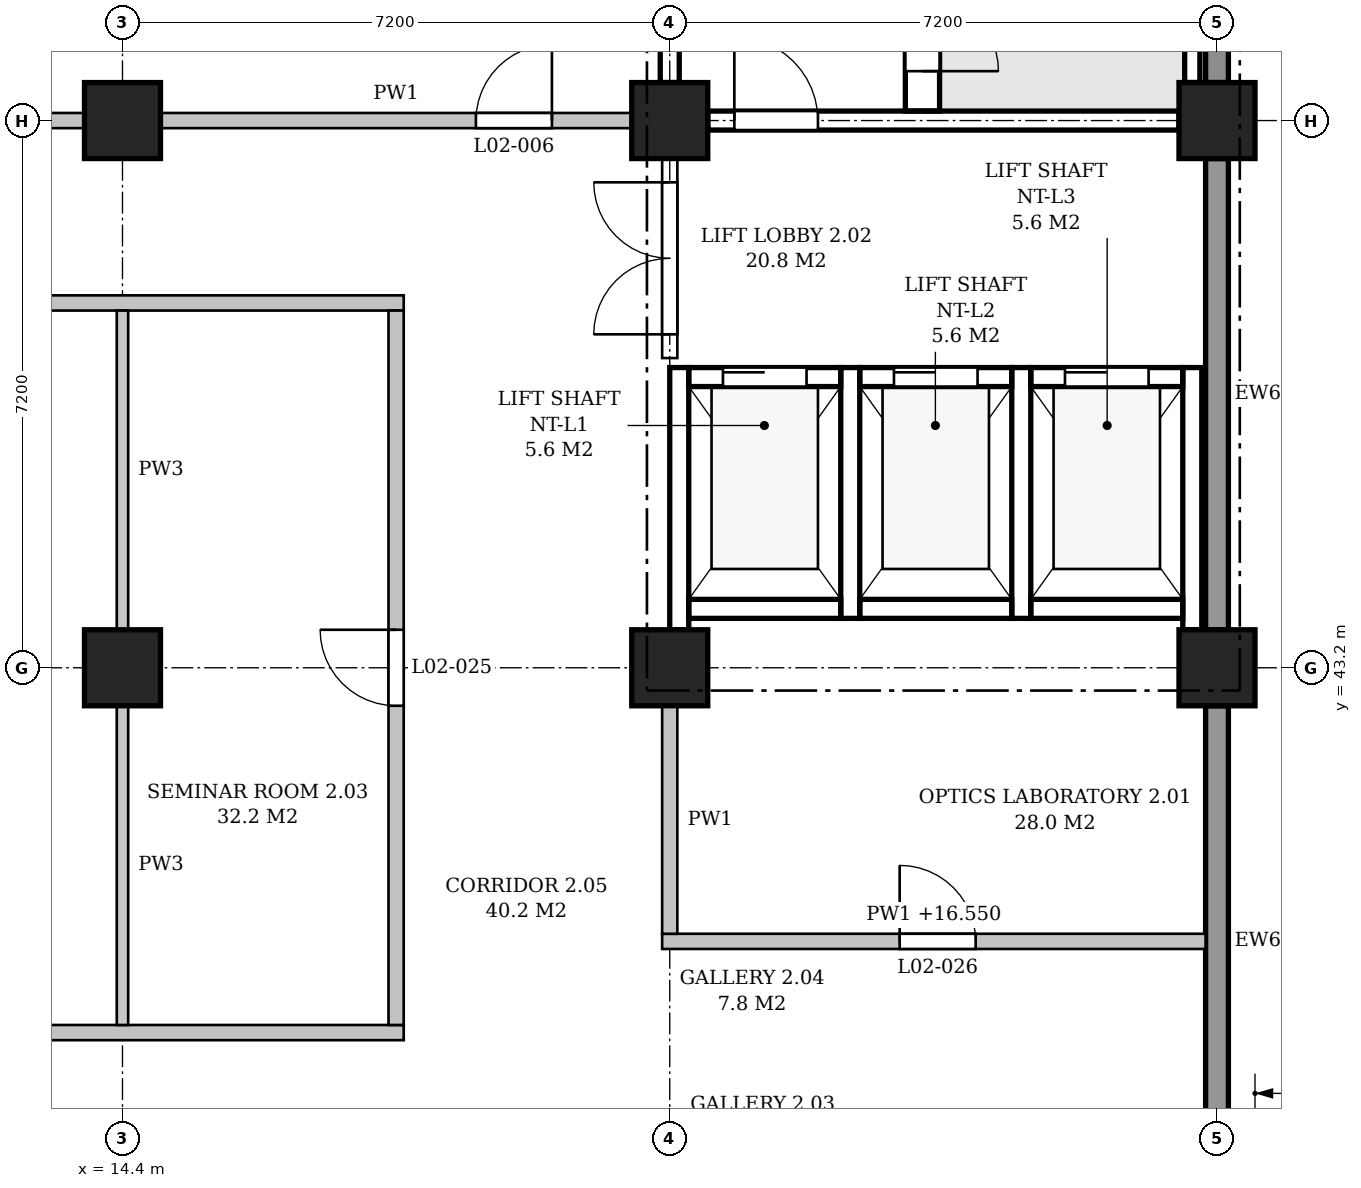
"""IFC4 building model, lengths in metres.
Left out: names, types, materials, properties, quantities, classifications, styles, units other than length and angle.
Written with IfcOpenShell. Run it as: python <this file> out.ifc"""

import sys

from ifc_helpers import new_model, si_unit, direction, frame, frame_2d, origin, origin_2d, place, context, subcontext, project, spatial, polyline, rectangle, outline, extrude, element, fill, save


model = new_model("IFC4")
c1 = context("Model", 3, precision=1e-05, world=origin(), true_north=direction((0.0, 1.0)))
c2 = subcontext(c1, "Body", "Model", "MODEL_VIEW")
j1 = project(units=[si_unit("LENGTHUNIT", "METRE"), si_unit("PLANEANGLEUNIT", "RADIAN")], contexts=[c1])
p1 = place(None, origin())
s1 = spatial("IfcSite", under=j1, at=p1, CompositionType="ELEMENT")
p2 = place(p1, origin())
s2 = spatial("IfcBuilding", under=s1, at=p2, CompositionType="ELEMENT")
p3 = place(p2, frame((0.0, 0.0, 11.4)))
s3 = spatial("IfcBuildingStorey", under=s2, at=p3, CompositionType="ELEMENT", Elevation=11.4)
for number, where, z_axis, x_axis in (
    (1, (14.4, 43.2, 0.0), (0.0, 0.0, 1.0), (1.0, 0.0, 0.0)),
    (2, (14.4, 50.4, 0.0), (0.0, 0.0, 1.0), (1.0, 0.0, 0.0)),
    (3, (21.6, 43.2, 0.0), (0.0, 0.0, 1.0), (1.0, 0.0, 0.0)),
    (4, (21.6, 50.4, 0.0), (0.0, 0.0, 1.0), (1.0, 0.0, 0.0)),
    (5, (28.8, 43.2, 0.0), (0.0, 0.0, 1.0), (1.0, 0.0, 0.0)),
    (6, (28.8, 50.4, 0.0), (0.0, 0.0, 1.0), (1.0, 0.0, 0.0)),
):
    element("IfcColumn", number, at=place(p3, frame(where, z_axis=z_axis, x_axis=x_axis)), inside=s3, PredefinedType="COLUMN", context=c2, shape_type="SweptSolid", body=[
        extrude(rectangle(XDim=1.0, YDim=1.0, at=origin_2d()), origin(), (0.0, 0.0, 1.0), 5.4),
    ])
for number, where, z_axis, x_axis in (
    (7, (28.8, 36.5, 0.0), (0.0, 0.0, 1.0), (0.0, 1.0, 0.0)),
    (8, (28.8, 43.7, 0.0), (0.0, 0.0, 1.0), (0.0, 1.0, 0.0)),
):
    element("IfcWall", number, at=place(p3, frame(where, z_axis=z_axis, x_axis=x_axis)), inside=s3, PredefinedType="STANDARD", context=c2, shape_type="SweptSolid", body=[
        extrude(rectangle(XDim=6.2, YDim=0.3, at=frame_2d((3.1, 0.0))), origin(), (0.0, 0.0, 1.0), 4.55),
    ])
p4 = place(p3, frame((28.8, 50.9, 0.0), z_axis=(0.0, 0.0, 1.0), x_axis=(0.0, 1.0, 0.0)))
e9 = element("IfcWall", 9, at=p4, inside=s3, PredefinedType="STANDARD", context=c2, shape_type="SweptSolid", body=[
    extrude(rectangle(XDim=6.2, YDim=0.3, at=frame_2d((3.1, 0.0))), origin(), (0.0, 0.0, 1.0), 4.55),
])
p5 = place(p3, frame((22.1, 50.4, 0.0), z_axis=(0.0, 0.0, 1.0), x_axis=(1.0, 0.0, 0.0)))
e10 = element("IfcWall", 10, at=p5, inside=s3, PredefinedType="SHEAR", context=c2, shape_type="SweptSolid", body=[
    extrude(rectangle(XDim=6.2, YDim=0.25, at=frame_2d((3.1, 0.0))), origin(), (0.0, 0.0, 1.0), 4.4),
])
p6 = place(p5, frame((0.35, 0.0, 0.0)))
e11 = element("IfcOpeningElement", 11, at=p6, cuts=e10, PredefinedType="OPENING", context=c2, shape_type="SweptSolid", body=[
    extrude(rectangle(XDim=1.1, YDim=2.1, at=frame_2d((0.55, 1.05))), frame((0.0, 0.135, 0.0), z_axis=(0.0, -1.0, 0.0), x_axis=(1.0, 0.0, 0.0)), (0.0, 0.0, 1.0), 0.27),
])
p7 = place(p3, frame((21.6, 50.9, 0.0), z_axis=(0.0, 0.0, 1.0), x_axis=(0.0, 1.0, 0.0)))
e12 = element("IfcWall", 12, at=p7, inside=s3, PredefinedType="SHEAR", context=c2, shape_type="SweptSolid", body=[
    extrude(rectangle(XDim=6.2, YDim=0.25, at=frame_2d((3.1, 0.0))), origin(), (0.0, 0.0, 1.0), 4.4),
])
p8 = place(p3, frame((28.475, 50.9, -0.25), z_axis=(0.0, 0.0, 1.0), x_axis=(0.0, 1.0, 0.0)))
e13 = element("IfcWall", 13, at=p8, inside=s3, PredefinedType="SHEAR", context=c2, shape_type="SweptSolid", body=[
    extrude(rectangle(XDim=6.2, YDim=0.2, at=frame_2d((3.1, 0.0))), origin(), (0.0, 0.0, 1.0), 5.4),
])
p9 = place(p3, frame((24.925, 50.525, 0.0), z_axis=(0.0, 0.0, 1.0), x_axis=(0.0, 1.0, 0.0)))
e14 = element("IfcWall", 14, at=p9, inside=s3, PredefinedType="SHEAR", context=c2, shape_type="SweptSolid", body=[
    extrude(rectangle(XDim=6.85, YDim=0.45, at=frame_2d((3.425, 0.0))), origin(), (0.0, 0.0, 1.0), 5.15),
])
p10 = place(p9, frame((0.525, 0.0, 0.0)))
e15 = element("IfcOpeningElement", 15, at=p10, cuts=e14, PredefinedType="OPENING", context=c2, shape_type="SweptSolid", body=[
    extrude(rectangle(XDim=1.0, YDim=2.1, at=frame_2d((0.5, 1.05))), frame((0.0, 0.235, 0.0), z_axis=(0.0, -1.0, 0.0), x_axis=(1.0, 0.0, 0.0)), (0.0, 0.0, 1.0), 0.47),
])
p11 = place(p3, frame((21.725, 43.7, -0.25), z_axis=(0.0, 0.0, 1.0), x_axis=(0.0, 1.0, 0.0)))
e16 = element("IfcWall", 16, at=p11, inside=s3, PredefinedType="SHEAR", context=c2, shape_type="SweptSolid", body=[
    extrude(rectangle(XDim=3.45, YDim=0.25, at=frame_2d((1.725, 0.0))), origin(), (0.0, 0.0, 1.0), 4.65),
])
for number, where, z_axis, x_axis in (
    (17, (23.975, 43.85, -0.25), (0.0, 0.0, 1.0), (0.0, 1.0, 0.0)),
    (18, (26.225, 43.85, -0.25), (0.0, 0.0, 1.0), (0.0, 1.0, 0.0)),
):
    element("IfcWall", number, at=place(p3, frame(where, z_axis=z_axis, x_axis=x_axis)), inside=s3, PredefinedType="SHEAR", context=c2, shape_type="SweptSolid", body=[
        extrude(rectangle(XDim=3.3, YDim=0.25, at=frame_2d((1.65, 0.0))), origin(), (0.0, 0.0, 1.0), 5.4),
    ])
p12 = place(p3, frame((28.475, 43.7, -0.25), z_axis=(0.0, 0.0, 1.0), x_axis=(0.0, 1.0, 0.0)))
e19 = element("IfcWall", 19, at=p12, inside=s3, PredefinedType="SHEAR", context=c2, shape_type="SweptSolid", body=[
    extrude(rectangle(XDim=3.45, YDim=0.25, at=frame_2d((1.725, 0.0))), origin(), (0.0, 0.0, 1.0), 5.4),
])
p13 = place(p3, frame((21.85, 47.025, -0.25), z_axis=(0.0, 0.0, 1.0), x_axis=(1.0, 0.0, 0.0)))
e20 = element("IfcWall", 20, at=p13, inside=s3, PredefinedType="SHEAR", context=c2, shape_type="SweptSolid", body=[
    extrude(rectangle(XDim=2.0, YDim=0.25, at=frame_2d((1.0, 0.0))), origin(), (0.0, 0.0, 1.0), 5.4),
])
p14 = place(p13, frame((0.45, 0.0, 0.25)))
e21 = element("IfcOpeningElement", 21, at=p14, cuts=e20, PredefinedType="OPENING", context=c2, shape_type="SweptSolid", body=[
    extrude(rectangle(XDim=1.1, YDim=2.1, at=frame_2d((0.55, 1.05))), frame((0.0, 0.135, 0.0), z_axis=(0.0, -1.0, 0.0), x_axis=(1.0, 0.0, 0.0)), (0.0, 0.0, 1.0), 0.27),
])
p15 = place(p3, frame((21.85, 43.975, -0.25), z_axis=(0.0, 0.0, 1.0), x_axis=(1.0, 0.0, 0.0)))
e22 = element("IfcWall", 22, at=p15, inside=s3, PredefinedType="SHEAR", context=c2, shape_type="SweptSolid", body=[
    extrude(rectangle(XDim=2.0, YDim=0.25, at=frame_2d((1.0, 0.0))), origin(), (0.0, 0.0, 1.0), 5.4),
])
p16 = place(p3, frame((24.1, 47.025, -0.25), z_axis=(0.0, 0.0, 1.0), x_axis=(1.0, 0.0, 0.0)))
e23 = element("IfcWall", 23, at=p16, inside=s3, PredefinedType="SHEAR", context=c2, shape_type="SweptSolid", body=[
    extrude(rectangle(XDim=2.0, YDim=0.25, at=frame_2d((1.0, 0.0))), origin(), (0.0, 0.0, 1.0), 5.4),
])
p17 = place(p16, frame((0.45, 0.0, 0.25)))
e24 = element("IfcOpeningElement", 24, at=p17, cuts=e23, PredefinedType="OPENING", context=c2, shape_type="SweptSolid", body=[
    extrude(rectangle(XDim=1.1, YDim=2.1, at=frame_2d((0.55, 1.05))), frame((0.0, 0.135, 0.0), z_axis=(0.0, -1.0, 0.0), x_axis=(1.0, 0.0, 0.0)), (0.0, 0.0, 1.0), 0.27),
])
p18 = place(p3, frame((24.1, 43.975, -0.25), z_axis=(0.0, 0.0, 1.0), x_axis=(1.0, 0.0, 0.0)))
e25 = element("IfcWall", 25, at=p18, inside=s3, PredefinedType="SHEAR", context=c2, shape_type="SweptSolid", body=[
    extrude(rectangle(XDim=2.0, YDim=0.25, at=frame_2d((1.0, 0.0))), origin(), (0.0, 0.0, 1.0), 5.4),
])
p19 = place(p3, frame((26.35, 47.025, -0.25), z_axis=(0.0, 0.0, 1.0), x_axis=(1.0, 0.0, 0.0)))
e26 = element("IfcWall", 26, at=p19, inside=s3, PredefinedType="SHEAR", context=c2, shape_type="SweptSolid", body=[
    extrude(rectangle(XDim=2.0, YDim=0.25, at=frame_2d((1.0, 0.0))), origin(), (0.0, 0.0, 1.0), 5.4),
])
p20 = place(p19, frame((0.45, 0.0, 0.25)))
e27 = element("IfcOpeningElement", 27, at=p20, cuts=e26, PredefinedType="OPENING", context=c2, shape_type="SweptSolid", body=[
    extrude(rectangle(XDim=1.1, YDim=2.1, at=frame_2d((0.55, 1.05))), frame((0.0, 0.135, 0.0), z_axis=(0.0, -1.0, 0.0), x_axis=(1.0, 0.0, 0.0)), (0.0, 0.0, 1.0), 0.27),
])
p21 = place(p3, frame((26.35, 43.975, -0.25), z_axis=(0.0, 0.0, 1.0), x_axis=(1.0, 0.0, 0.0)))
e28 = element("IfcWall", 28, at=p21, inside=s3, PredefinedType="SHEAR", context=c2, shape_type="SweptSolid", body=[
    extrude(rectangle(XDim=2.0, YDim=0.25, at=frame_2d((1.0, 0.0))), origin(), (0.0, 0.0, 1.0), 5.4),
])
p22 = place(p3, frame((3.5, 38.4, 0.0), z_axis=(0.0, 0.0, 1.0), x_axis=(1.0, 0.0, 0.0)))
e29 = element("IfcWall", 29, at=p22, inside=s3, PredefinedType="PARTITIONING", context=c2, shape_type="SweptSolid", body=[
    extrude(outline(polyline([(0.0, 0.0), (14.6, 0.0), (14.6, 5.15), (11.15, 5.15), (11.15, 4.4), (10.65, 4.4), (10.65, 5.15), (3.95, 5.15), (3.95, 4.4), (3.45, 4.4), (3.45, 5.15), (0.0, 5.15), (0.0, 0.0)])), frame((0.0, 0.1, 0.0), z_axis=(0.0, -1.0, 0.0), x_axis=(1.0, 0.0, 0.0)), (0.0, 0.0, 1.0), 0.2),
])
p23 = place(p3, frame((21.5, 39.6, 0.0), z_axis=(0.0, 0.0, 1.0), x_axis=(1.0, 0.0, 0.0)))
e30 = element("IfcWall", 30, at=p23, inside=s3, PredefinedType="PARTITIONING", context=c2, shape_type="SweptSolid", body=[
    extrude(outline(polyline([(0.0, 0.0), (7.15, 0.0), (7.15, 4.55), (7.05, 4.55), (7.05, 5.15), (0.35, 5.15), (0.35, 4.4), (0.0, 4.4), (0.0, 0.0)])), frame((0.0, 0.1, 0.0), z_axis=(0.0, -1.0, 0.0), x_axis=(1.0, 0.0, 0.0)), (0.0, 0.0, 1.0), 0.2),
])
p24 = place(p23, frame((3.125, 0.0, 0.0)))
e31 = element("IfcOpeningElement", 31, at=p24, cuts=e30, PredefinedType="OPENING", context=c2, shape_type="SweptSolid", body=[
    extrude(rectangle(XDim=1.0, YDim=2.1, at=frame_2d((0.5, 1.05))), frame((0.0, 0.11, 0.0), z_axis=(0.0, -1.0, 0.0), x_axis=(1.0, 0.0, 0.0)), (0.0, 0.0, 1.0), 0.22),
])
p25 = place(p3, frame((3.5, 48.0, 0.0), z_axis=(0.0, 0.0, 1.0), x_axis=(1.0, 0.0, 0.0)))
e32 = element("IfcWall", 32, at=p25, inside=s3, PredefinedType="PARTITIONING", context=c2, shape_type="SweptSolid", body=[
    extrude(outline(polyline([(0.0, 0.0), (14.6, 0.0), (14.6, 5.15), (11.15, 5.15), (11.15, 4.4), (10.65, 4.4), (10.65, 5.15), (3.95, 5.15), (3.95, 4.4), (3.45, 4.4), (3.45, 5.15), (0.0, 5.15), (0.0, 0.0)])), frame((0.0, 0.1, 0.0), z_axis=(0.0, -1.0, 0.0), x_axis=(1.0, 0.0, 0.0)), (0.0, 0.0, 1.0), 0.2),
])
p26 = place(p25, frame((6.8, 0.0, 0.0)))
e33 = element("IfcOpeningElement", 33, at=p26, cuts=e32, PredefinedType="OPENING", context=c2, shape_type="SweptSolid", body=[
    extrude(rectangle(XDim=1.0, YDim=2.1, at=frame_2d((0.5, 1.05))), frame((0.0, 0.11, 0.0), z_axis=(0.0, -1.0, 0.0), x_axis=(1.0, 0.0, 0.0)), (0.0, 0.0, 1.0), 0.22),
])
p27 = place(p25, frame((4.7, 0.0, 0.0)))
e34 = element("IfcOpeningElement", 34, at=p27, cuts=e32, PredefinedType="OPENING", context=c2, shape_type="SweptSolid", body=[
    extrude(rectangle(XDim=1.0, YDim=2.1, at=frame_2d((0.5, 1.05))), frame((0.0, 0.11, 0.0), z_axis=(0.0, -1.0, 0.0), x_axis=(1.0, 0.0, 0.0)), (0.0, 0.0, 1.0), 0.22),
])
p28 = place(p3, frame((7.7, 50.4, 0.0), z_axis=(0.0, 0.0, 1.0), x_axis=(1.0, 0.0, 0.0)))
e35 = element("IfcWall", 35, at=p28, inside=s3, PredefinedType="PARTITIONING", context=c2, shape_type="SweptSolid", body=[
    extrude(rectangle(XDim=6.2, YDim=0.2, at=frame_2d((3.1, 0.0))), origin(), (0.0, 0.0, 1.0), 4.4),
])
p29 = place(p28, frame((2.6, 0.0, 0.0)))
e36 = element("IfcOpeningElement", 36, at=p29, cuts=e35, PredefinedType="OPENING", context=c2, shape_type="SweptSolid", body=[
    extrude(rectangle(XDim=1.0, YDim=2.1, at=frame_2d((0.5, 1.05))), frame((0.0, 0.11, 0.0), z_axis=(0.0, -1.0, 0.0), x_axis=(1.0, 0.0, 0.0)), (0.0, 0.0, 1.0), 0.22),
])
p30 = place(p3, frame((14.9, 50.4, 0.0), z_axis=(0.0, 0.0, 1.0), x_axis=(1.0, 0.0, 0.0)))
e37 = element("IfcWall", 37, at=p30, inside=s3, PredefinedType="PARTITIONING", context=c2, shape_type="SweptSolid", body=[
    extrude(rectangle(XDim=6.2, YDim=0.2, at=frame_2d((3.1, 0.0))), origin(), (0.0, 0.0, 1.0), 4.4),
])
p31 = place(p30, frame((4.15, 0.0, 0.0)))
e38 = element("IfcOpeningElement", 38, at=p31, cuts=e37, PredefinedType="OPENING", context=c2, shape_type="SweptSolid", body=[
    extrude(rectangle(XDim=1.0, YDim=2.1, at=frame_2d((0.5, 1.05))), frame((0.0, 0.11, 0.0), z_axis=(0.0, -1.0, 0.0), x_axis=(1.0, 0.0, 0.0)), (0.0, 0.0, 1.0), 0.22),
])
for number, where, z_axis, x_axis in (
    (39, (14.4, 38.5, 0.0), (0.0, 0.0, 1.0), (0.0, 1.0, 0.0)),
    (40, (14.4, 43.7, 0.0), (0.0, 0.0, 1.0), (0.0, 1.0, 0.0)),
):
    element("IfcWall", number, at=place(p3, frame(where, z_axis=z_axis, x_axis=x_axis)), inside=s3, PredefinedType="PARTITIONING", context=c2, shape_type="SweptSolid", body=[
        extrude(rectangle(XDim=4.2, YDim=0.15, at=frame_2d((2.1, 0.0))), origin(), (0.0, 0.0, 1.0), 4.4),
    ])
p32 = place(p3, frame((18.0, 38.5, 0.0), z_axis=(0.0, 0.0, 1.0), x_axis=(0.0, 1.0, 0.0)))
e41 = element("IfcWall", 41, at=p32, inside=s3, PredefinedType="PARTITIONING", context=c2, shape_type="SweptSolid", body=[
    extrude(outline(polyline([(0.0, 0.0), (9.4, 0.0), (9.4, 5.15), (4.95, 5.15), (4.95, 4.4), (4.45, 4.4), (4.45, 5.15), (0.0, 5.15), (0.0, 0.0)])), frame((0.0, 0.1, 0.0), z_axis=(0.0, -1.0, 0.0), x_axis=(1.0, 0.0, 0.0)), (0.0, 0.0, 1.0), 0.2),
])
p33 = place(p32, frame((4.2, 0.0, 0.0)))
e42 = element("IfcOpeningElement", 42, at=p33, cuts=e41, PredefinedType="OPENING", context=c2, shape_type="SweptSolid", body=[
    extrude(rectangle(XDim=1.0, YDim=2.1, at=frame_2d((0.5, 1.05))), frame((0.0, 0.11, 0.0), z_axis=(0.0, -1.0, 0.0), x_axis=(1.0, 0.0, 0.0)), (0.0, 0.0, 1.0), 0.22),
])
p34 = place(p3, frame((21.6, 39.7, 0.0), z_axis=(0.0, 0.0, 1.0), x_axis=(0.0, 1.0, 0.0)))
e43 = element("IfcWall", 43, at=p34, inside=s3, PredefinedType="PARTITIONING", context=c2, shape_type="SweptSolid", body=[
    extrude(rectangle(XDim=3.0, YDim=0.2, at=frame_2d((1.5, 0.0))), origin(), (0.0, 0.0, 1.0), 4.4),
])
p35 = place(p3, frame((21.6, 47.275, 0.0), z_axis=(0.0, 0.0, 1.0), x_axis=(0.0, 1.0, 0.0)))
e44 = element("IfcWall", 44, at=p35, inside=s3, PredefinedType="PARTITIONING", context=c2, shape_type="SweptSolid", body=[
    extrude(rectangle(XDim=2.625, YDim=0.2, at=frame_2d((1.312, 0.0))), origin(), (0.0, 0.0, 1.0), 4.4),
])
p36 = place(p35, frame((0.312, 0.0, 0.0)))
e45 = element("IfcOpeningElement", 45, at=p36, cuts=e44, PredefinedType="OPENING", context=c2, shape_type="SweptSolid", body=[
    extrude(rectangle(XDim=2.0, YDim=2.4, at=frame_2d((1.0, 1.2))), frame((0.0, 0.11, 0.0), z_axis=(0.0, -1.0, 0.0), x_axis=(1.0, 0.0, 0.0)), (0.0, 0.0, 1.0), 0.22),
])
p37 = place(p10, frame((1.0, 0.0, 0.0), z_axis=(0.0, 0.0, 1.0), x_axis=(-1.0, 0.0, 0.0)))
e46 = element("IfcDoor", 46, at=p37, inside=s3, OperationType="SINGLE_SWING_RIGHT", PredefinedType="DOOR", context=c2, shape_type="SweptSolid", body=[
    extrude(rectangle(XDim=1.0, YDim=2.1, at=frame_2d((0.5, 1.05))), frame((0.0, 0.025, 0.0), z_axis=(0.0, -1.0, 0.0), x_axis=(1.0, 0.0, 0.0)), (0.0, 0.0, 1.0), 0.05),
])
fill(e15, e46)
p38 = place(p6, origin())
e47 = element("IfcDoor", 47, at=p38, inside=s3, OperationType="SINGLE_SWING_LEFT", PredefinedType="DOOR", context=c2, shape_type="SweptSolid", body=[
    extrude(rectangle(XDim=1.1, YDim=2.1, at=frame_2d((0.55, 1.05))), frame((0.0, 0.025, 0.0), z_axis=(0.0, -1.0, 0.0), x_axis=(1.0, 0.0, 0.0)), (0.0, 0.0, 1.0), 0.05),
])
fill(e11, e47)
p39 = place(p14, origin())
e48 = element("IfcDoor", 48, at=p39, inside=s3, OperationType="SLIDING_TO_LEFT", PredefinedType="DOOR", context=c2, shape_type="SweptSolid", body=[
    extrude(rectangle(XDim=1.1, YDim=2.1, at=frame_2d((0.55, 1.05))), frame((0.0, 0.025, 0.0), z_axis=(0.0, -1.0, 0.0), x_axis=(1.0, 0.0, 0.0)), (0.0, 0.0, 1.0), 0.05),
])
fill(e21, e48)
p40 = place(p17, origin())
e49 = element("IfcDoor", 49, at=p40, inside=s3, OperationType="SLIDING_TO_LEFT", PredefinedType="DOOR", context=c2, shape_type="SweptSolid", body=[
    extrude(rectangle(XDim=1.1, YDim=2.1, at=frame_2d((0.55, 1.05))), frame((0.0, 0.025, 0.0), z_axis=(0.0, -1.0, 0.0), x_axis=(1.0, 0.0, 0.0)), (0.0, 0.0, 1.0), 0.05),
])
fill(e24, e49)
p41 = place(p20, origin())
e50 = element("IfcDoor", 50, at=p41, inside=s3, OperationType="SLIDING_TO_LEFT", PredefinedType="DOOR", context=c2, shape_type="SweptSolid", body=[
    extrude(rectangle(XDim=1.1, YDim=2.1, at=frame_2d((0.55, 1.05))), frame((0.0, 0.025, 0.0), z_axis=(0.0, -1.0, 0.0), x_axis=(1.0, 0.0, 0.0)), (0.0, 0.0, 1.0), 0.05),
])
fill(e27, e50)
p42 = place(p36, origin())
e51 = element("IfcDoor", 51, at=p42, inside=s3, OperationType="DOUBLE_DOOR_SINGLE_SWING", PredefinedType="DOOR", context=c2, shape_type="SweptSolid", body=[
    extrude(rectangle(XDim=2.0, YDim=2.4, at=frame_2d((1.0, 1.2))), frame((0.0, 0.025, 0.0), z_axis=(0.0, -1.0, 0.0), x_axis=(1.0, 0.0, 0.0)), (0.0, 0.0, 1.0), 0.05),
])
fill(e45, e51)
p43 = place(p31, origin())
e52 = element("IfcDoor", 52, at=p43, inside=s3, OperationType="SINGLE_SWING_RIGHT", PredefinedType="DOOR", context=c2, shape_type="SweptSolid", body=[
    extrude(rectangle(XDim=1.0, YDim=2.1, at=frame_2d((0.5, 1.05))), frame((0.0, 0.025, 0.0), z_axis=(0.0, -1.0, 0.0), x_axis=(1.0, 0.0, 0.0)), (0.0, 0.0, 1.0), 0.05),
])
fill(e38, e52)
p44 = place(p33, origin())
e53 = element("IfcDoor", 53, at=p44, inside=s3, OperationType="SINGLE_SWING_RIGHT", PredefinedType="DOOR", context=c2, shape_type="SweptSolid", body=[
    extrude(rectangle(XDim=1.0, YDim=2.1, at=frame_2d((0.5, 1.05))), frame((0.0, 0.025, 0.0), z_axis=(0.0, -1.0, 0.0), x_axis=(1.0, 0.0, 0.0)), (0.0, 0.0, 1.0), 0.05),
])
fill(e42, e53)
p45 = place(p24, origin())
e54 = element("IfcDoor", 54, at=p45, inside=s3, OperationType="SINGLE_SWING_LEFT", PredefinedType="DOOR", context=c2, shape_type="SweptSolid", body=[
    extrude(rectangle(XDim=1.0, YDim=2.1, at=frame_2d((0.5, 1.05))), frame((0.0, 0.025, 0.0), z_axis=(0.0, -1.0, 0.0), x_axis=(1.0, 0.0, 0.0)), (0.0, 0.0, 1.0), 0.05),
])
fill(e31, e54)
save(model, sys.argv[1])
